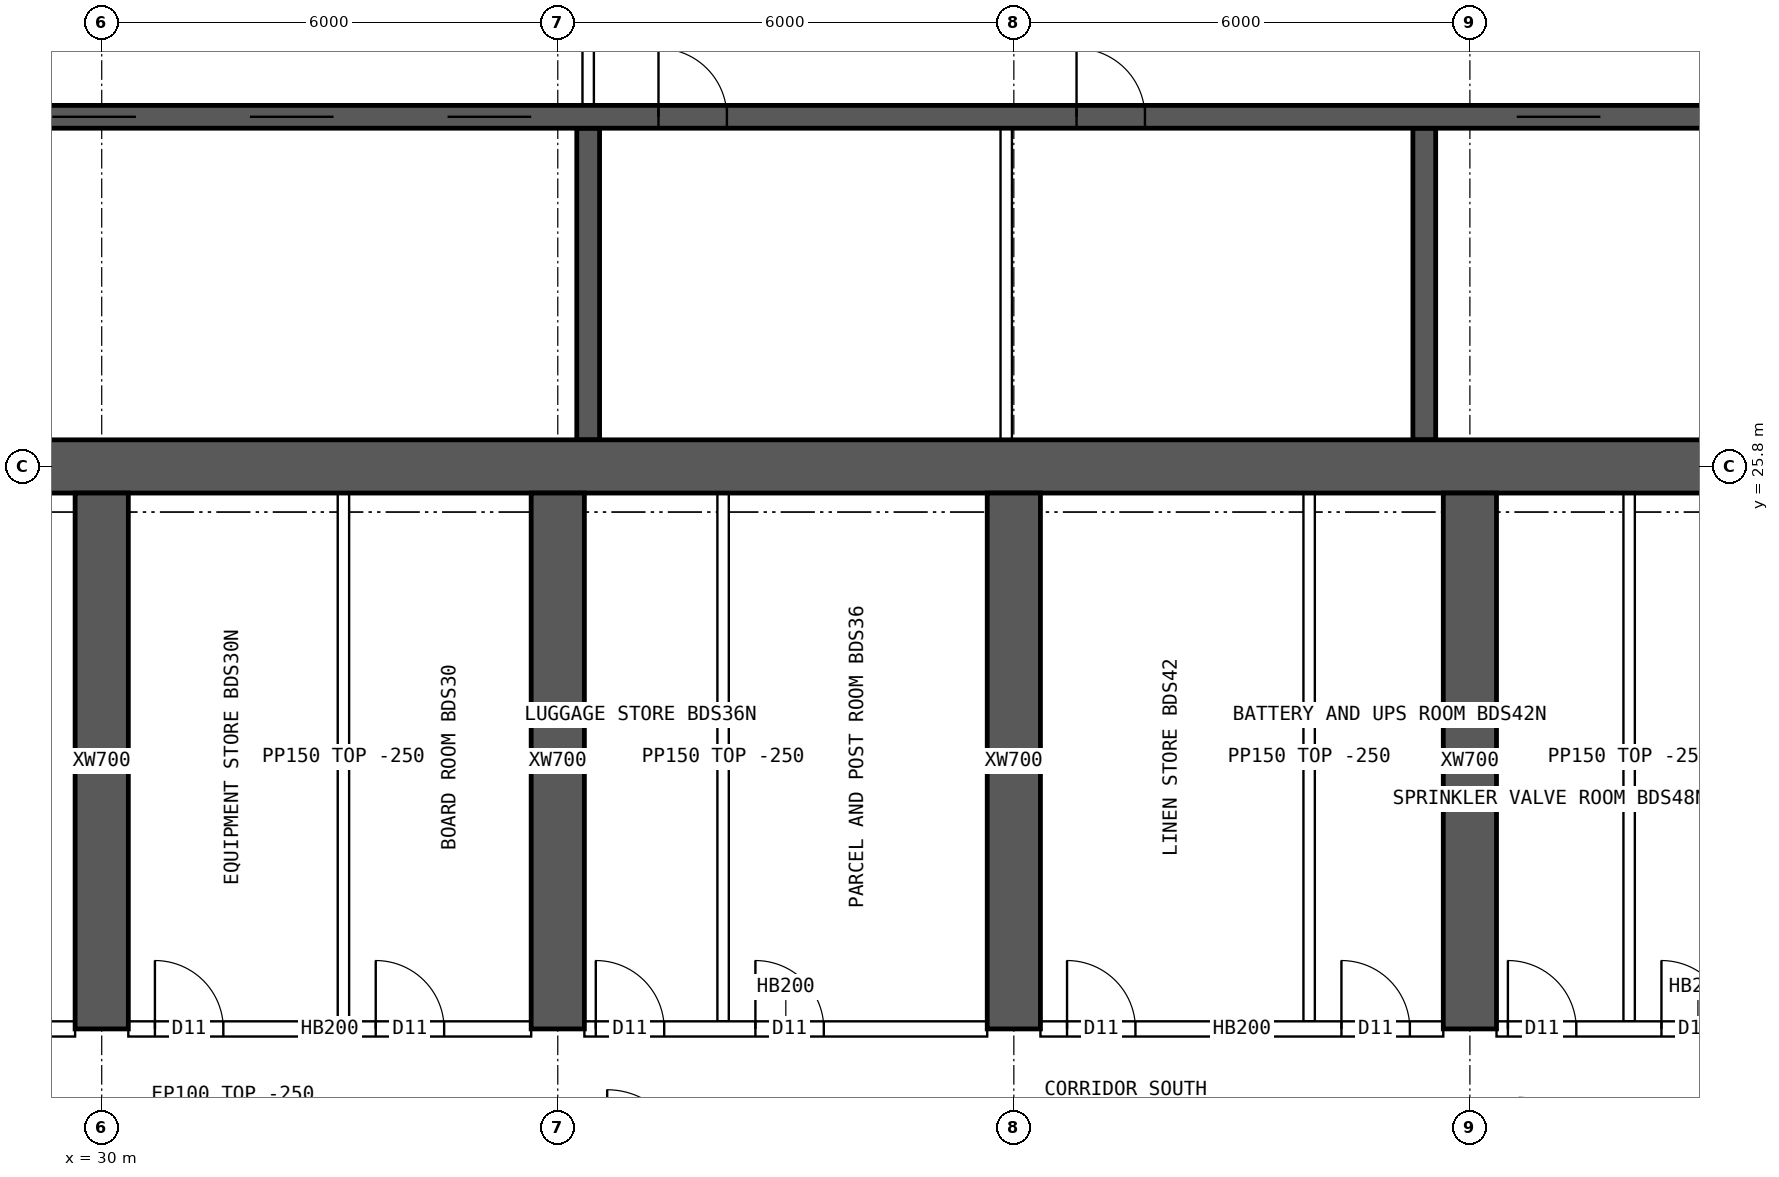
"""IFC4 building model, lengths in metres.
Left out: names, types, materials, properties, quantities, classifications, styles, units other than length and angle.
Written with IfcOpenShell. Run it as: python <this file> out.ifc"""

import sys

from ifc_helpers import new_model, si_unit, direction, frame, frame_2d, origin, place, context, subcontext, project, spatial, rectangle, extrude, element, fill, save


model = new_model("IFC4")
c1 = context("Model", 3, precision=1e-05, world=origin(), true_north=direction((0.0, 1.0)))
c2 = subcontext(c1, "Body", "Model", "MODEL_VIEW")
j1 = project(units=[si_unit("LENGTHUNIT", "METRE"), si_unit("PLANEANGLEUNIT", "RADIAN")], contexts=[c1])
p1 = place(None, origin())
s1 = spatial("IfcSite", under=j1, at=p1, CompositionType="ELEMENT")
p2 = place(p1, origin())
s2 = spatial("IfcBuilding", under=s1, at=p2, CompositionType="ELEMENT")
p3 = place(p2, frame((0.0, 0.0, 239.05)))
s3 = spatial("IfcBuildingStorey", under=s2, at=p3, CompositionType="ELEMENT", Elevation=239.05)
p4 = place(p3, frame((18.0, 25.8, 0.0), z_axis=(0.0, 0.0, 1.0), x_axis=(1.0, 0.0, 0.0)))
e1 = element("IfcWall", 1, at=p4, inside=s3, PredefinedType="SHEAR", context=c2, shape_type="SweptSolid", body=[
    extrude(rectangle(XDim=48.0, YDim=0.7, at=frame_2d((24.0, 0.0))), origin(), (0.0, 0.0, 1.0), 3.75),
])
p5 = place(p3, frame((18.35, 30.4, 0.0), z_axis=(0.0, 0.0, 1.0), x_axis=(1.0, 0.0, 0.0)))
e2 = element("IfcWall", 2, at=p5, inside=s3, PredefinedType="SHEAR", context=c2, shape_type="SweptSolid", body=[
    extrude(rectangle(XDim=47.3, YDim=0.3, at=frame_2d((23.65, 0.0))), origin(), (0.0, 0.0, 1.0), 3.75),
])
p6 = place(p5, frame((0.4, 0.0, 0.0)))
e3 = element("IfcOpeningElement", 3, at=p6, cuts=e2, PredefinedType="OPENING", context=c2, shape_type="SweptSolid", body=[
    extrude(rectangle(XDim=1.0, YDim=2.1, at=frame_2d((0.5, 1.05))), frame((0.0, 0.16, 0.0), z_axis=(0.0, -1.0, 0.0), x_axis=(1.0, 0.0, 0.0)), (0.0, 0.0, 1.0), 0.32),
])
p7 = place(p5, frame((45.9, 0.0, 0.0)))
e4 = element("IfcOpeningElement", 4, at=p7, cuts=e2, PredefinedType="OPENING", context=c2, shape_type="SweptSolid", body=[
    extrude(rectangle(XDim=1.0, YDim=2.1, at=frame_2d((0.5, 1.05))), frame((0.0, 0.16, 0.0), z_axis=(0.0, -1.0, 0.0), x_axis=(1.0, 0.0, 0.0)), (0.0, 0.0, 1.0), 0.32),
])
p8 = place(p5, frame((8.4, 0.0, 0.0)))
e5 = element("IfcOpeningElement", 5, at=p8, cuts=e2, PredefinedType="OPENING", context=c2, shape_type="SweptSolid", body=[
    extrude(rectangle(XDim=1.1, YDim=2.1, at=frame_2d((0.55, 1.05))), frame((0.0, 0.16, 0.0), z_axis=(0.0, -1.0, 0.0), x_axis=(1.0, 0.0, 0.0)), (0.0, 0.0, 1.0), 0.32),
])
p9 = place(p5, frame((11.0, 0.0, 0.0)))
e6 = element("IfcOpeningElement", 6, at=p9, cuts=e2, PredefinedType="OPENING", context=c2, shape_type="SweptSolid", body=[
    extrude(rectangle(XDim=1.1, YDim=2.1, at=frame_2d((0.55, 1.05))), frame((0.0, 0.16, 0.0), z_axis=(0.0, -1.0, 0.0), x_axis=(1.0, 0.0, 0.0)), (0.0, 0.0, 1.0), 0.32),
])
p10 = place(p5, frame((13.6, 0.0, 0.0)))
e7 = element("IfcOpeningElement", 7, at=p10, cuts=e2, PredefinedType="OPENING", context=c2, shape_type="SweptSolid", body=[
    extrude(rectangle(XDim=1.1, YDim=2.1, at=frame_2d((0.55, 1.05))), frame((0.0, 0.16, 0.0), z_axis=(0.0, -1.0, 0.0), x_axis=(1.0, 0.0, 0.0)), (0.0, 0.0, 1.0), 0.32),
])
p11 = place(p5, frame((16.2, 0.0, 0.0)))
e8 = element("IfcOpeningElement", 8, at=p11, cuts=e2, PredefinedType="OPENING", context=c2, shape_type="SweptSolid", body=[
    extrude(rectangle(XDim=1.1, YDim=2.1, at=frame_2d((0.55, 1.05))), frame((0.0, 0.16, 0.0), z_axis=(0.0, -1.0, 0.0), x_axis=(1.0, 0.0, 0.0)), (0.0, 0.0, 1.0), 0.32),
])
p12 = place(p5, frame((18.975, 0.0, 0.0)))
e9 = element("IfcOpeningElement", 9, at=p12, cuts=e2, PredefinedType="OPENING", context=c2, shape_type="SweptSolid", body=[
    extrude(rectangle(XDim=0.9, YDim=2.1, at=frame_2d((0.45, 1.05))), frame((0.0, 0.16, 0.0), z_axis=(0.0, -1.0, 0.0), x_axis=(1.0, 0.0, 0.0)), (0.0, 0.0, 1.0), 0.32),
])
p13 = place(p5, frame((24.475, 0.0, 0.0)))
e10 = element("IfcOpeningElement", 10, at=p13, cuts=e2, PredefinedType="OPENING", context=c2, shape_type="SweptSolid", body=[
    extrude(rectangle(XDim=0.9, YDim=2.1, at=frame_2d((0.45, 1.05))), frame((0.0, 0.16, 0.0), z_axis=(0.0, -1.0, 0.0), x_axis=(1.0, 0.0, 0.0)), (0.0, 0.0, 1.0), 0.32),
])
p14 = place(p5, frame((30.267, 0.0, 0.0)))
e11 = element("IfcOpeningElement", 11, at=p14, cuts=e2, PredefinedType="OPENING", context=c2, shape_type="SweptSolid", body=[
    extrude(rectangle(XDim=1.1, YDim=2.1, at=frame_2d((0.55, 1.05))), frame((0.0, 0.16, 0.0), z_axis=(0.0, -1.0, 0.0), x_axis=(1.0, 0.0, 0.0)), (0.0, 0.0, 1.0), 0.32),
])
p15 = place(p5, frame((33.8, 0.0, 0.0)))
e12 = element("IfcOpeningElement", 12, at=p15, cuts=e2, PredefinedType="OPENING", context=c2, shape_type="SweptSolid", body=[
    extrude(rectangle(XDim=1.1, YDim=2.1, at=frame_2d((0.55, 1.05))), frame((0.0, 0.16, 0.0), z_axis=(0.0, -1.0, 0.0), x_axis=(1.0, 0.0, 0.0)), (0.0, 0.0, 1.0), 0.32),
])
p16 = place(p5, frame((37.333, 0.0, 0.0)))
e13 = element("IfcOpeningElement", 13, at=p16, cuts=e2, PredefinedType="OPENING", context=c2, shape_type="SweptSolid", body=[
    extrude(rectangle(XDim=1.1, YDim=2.1, at=frame_2d((0.55, 1.05))), frame((0.0, 0.16, 0.0), z_axis=(0.0, -1.0, 0.0), x_axis=(1.0, 0.0, 0.0)), (0.0, 0.0, 1.0), 0.32),
])
for number, where, z_axis, x_axis in (
    (14, (36.4, 26.15, 0.0), (0.0, 0.0, 1.0), (0.0, 1.0, 0.0)),
    (15, (47.4, 26.15, 0.0), (0.0, 0.0, 1.0), (0.0, 1.0, 0.0)),
):
    element("IfcWall", number, at=place(p3, frame(where, z_axis=z_axis, x_axis=x_axis)), inside=s3, PredefinedType="SHEAR", context=c2, shape_type="SweptSolid", body=[
        extrude(rectangle(XDim=4.1, YDim=0.3, at=frame_2d((2.05, 0.0))), origin(), (0.0, 0.0, 1.0), 3.75),
    ])
for number, where, z_axis, x_axis in (
    (16, (30.0, 18.4, 0.0), (0.0, 0.0, 1.0), (0.0, 1.0, 0.0)),
    (17, (36.0, 18.4, 0.0), (0.0, 0.0, 1.0), (0.0, 1.0, 0.0)),
    (18, (42.0, 18.4, 0.0), (0.0, 0.0, 1.0), (0.0, 1.0, 0.0)),
    (19, (48.0, 18.4, 0.0), (0.0, 0.0, 1.0), (0.0, 1.0, 0.0)),
):
    element("IfcWall", number, at=place(p3, frame(where, z_axis=z_axis, x_axis=x_axis)), inside=s3, PredefinedType="SHEAR", context=c2, shape_type="SweptSolid", body=[
        extrude(rectangle(XDim=7.05, YDim=0.7, at=frame_2d((3.525, 0.0))), origin(), (0.0, 0.0, 1.0), 3.75),
    ])
p17 = place(p3, frame((36.4, 30.55, 0.0), z_axis=(0.0, 0.0, 1.0), x_axis=(0.0, 1.0, 0.0)))
e20 = element("IfcWall", 20, at=p17, inside=s3, PredefinedType="SOLIDWALL", context=c2, shape_type="SweptSolid", body=[
    extrude(rectangle(XDim=3.9, YDim=0.15, at=frame_2d((1.95, 0.0))), origin(), (0.0, 0.0, 1.0), 3.5),
])
p18 = place(p17, frame((1.15, 0.0, 0.0)))
e21 = element("IfcOpeningElement", 21, at=p18, cuts=e20, PredefinedType="OPENING", context=c2, shape_type="SweptSolid", body=[
    extrude(rectangle(XDim=1.6, YDim=2.1, at=frame_2d((0.8, 1.05))), frame((0.0, 0.085, 0.0), z_axis=(0.0, -1.0, 0.0), x_axis=(1.0, 0.0, 0.0)), (0.0, 0.0, 1.0), 0.17),
])
p19 = place(p3, frame((41.9, 26.15, 0.0), z_axis=(0.0, 0.0, 1.0), x_axis=(0.0, 1.0, 0.0)))
e22 = element("IfcWall", 22, at=p19, inside=s3, PredefinedType="SOLIDWALL", context=c2, shape_type="SweptSolid", body=[
    extrude(rectangle(XDim=4.1, YDim=0.15, at=frame_2d((2.05, 0.0))), origin(), (0.0, 0.0, 1.0), 3.5),
])
p20 = place(p3, frame((24.35, 18.4, 0.0), z_axis=(0.0, 0.0, 1.0), x_axis=(1.0, 0.0, 0.0)))
e23 = element("IfcWall", 23, at=p20, inside=s3, PredefinedType="SOLIDWALL", context=c2, shape_type="SweptSolid", body=[
    extrude(rectangle(XDim=5.3, YDim=0.2, at=frame_2d((2.65, 0.0))), origin(), (0.0, 0.0, 1.0), 3.5),
])
p21 = place(p20, frame((0.15, 0.0, 0.0)))
e24 = element("IfcOpeningElement", 24, at=p21, cuts=e23, PredefinedType="OPENING", context=c2, shape_type="SweptSolid", body=[
    extrude(rectangle(XDim=0.9, YDim=2.1, at=frame_2d((0.45, 1.05))), frame((0.0, 0.11, 0.0), z_axis=(0.0, -1.0, 0.0), x_axis=(1.0, 0.0, 0.0)), (0.0, 0.0, 1.0), 0.22),
])
p22 = place(p20, frame((2.79, 0.0, 0.0)))
e25 = element("IfcOpeningElement", 25, at=p22, cuts=e23, PredefinedType="OPENING", context=c2, shape_type="SweptSolid", body=[
    extrude(rectangle(XDim=0.9, YDim=2.1, at=frame_2d((0.45, 1.05))), frame((0.0, 0.11, 0.0), z_axis=(0.0, -1.0, 0.0), x_axis=(1.0, 0.0, 0.0)), (0.0, 0.0, 1.0), 0.22),
])
p23 = place(p3, frame((30.35, 18.4, 0.0), z_axis=(0.0, 0.0, 1.0), x_axis=(1.0, 0.0, 0.0)))
e26 = element("IfcWall", 26, at=p23, inside=s3, PredefinedType="SOLIDWALL", context=c2, shape_type="SweptSolid", body=[
    extrude(rectangle(XDim=5.3, YDim=0.2, at=frame_2d((2.65, 0.0))), origin(), (0.0, 0.0, 1.0), 3.5),
])
p24 = place(p23, frame((0.35, 0.0, 0.0)))
e27 = element("IfcOpeningElement", 27, at=p24, cuts=e26, PredefinedType="OPENING", context=c2, shape_type="SweptSolid", body=[
    extrude(rectangle(XDim=0.9, YDim=2.1, at=frame_2d((0.45, 1.05))), frame((0.0, 0.11, 0.0), z_axis=(0.0, -1.0, 0.0), x_axis=(1.0, 0.0, 0.0)), (0.0, 0.0, 1.0), 0.22),
])
p25 = place(p23, frame((3.255, 0.0, 0.0)))
e28 = element("IfcOpeningElement", 28, at=p25, cuts=e26, PredefinedType="OPENING", context=c2, shape_type="SweptSolid", body=[
    extrude(rectangle(XDim=0.9, YDim=2.1, at=frame_2d((0.45, 1.05))), frame((0.0, 0.11, 0.0), z_axis=(0.0, -1.0, 0.0), x_axis=(1.0, 0.0, 0.0)), (0.0, 0.0, 1.0), 0.22),
])
p26 = place(p3, frame((36.35, 18.4, 0.0), z_axis=(0.0, 0.0, 1.0), x_axis=(1.0, 0.0, 0.0)))
e29 = element("IfcWall", 29, at=p26, inside=s3, PredefinedType="SOLIDWALL", context=c2, shape_type="SweptSolid", body=[
    extrude(rectangle(XDim=5.3, YDim=0.2, at=frame_2d((2.65, 0.0))), origin(), (0.0, 0.0, 1.0), 3.5),
])
p27 = place(p26, frame((0.15, 0.0, 0.0)))
e30 = element("IfcOpeningElement", 30, at=p27, cuts=e29, PredefinedType="OPENING", context=c2, shape_type="SweptSolid", body=[
    extrude(rectangle(XDim=0.9, YDim=2.1, at=frame_2d((0.45, 1.05))), frame((0.0, 0.11, 0.0), z_axis=(0.0, -1.0, 0.0), x_axis=(1.0, 0.0, 0.0)), (0.0, 0.0, 1.0), 0.22),
])
p28 = place(p26, frame((2.25, 0.0, 0.0)))
e31 = element("IfcOpeningElement", 31, at=p28, cuts=e29, PredefinedType="OPENING", context=c2, shape_type="SweptSolid", body=[
    extrude(rectangle(XDim=0.9, YDim=2.1, at=frame_2d((0.45, 1.05))), frame((0.0, 0.11, 0.0), z_axis=(0.0, -1.0, 0.0), x_axis=(1.0, 0.0, 0.0)), (0.0, 0.0, 1.0), 0.22),
])
p29 = place(p3, frame((42.35, 18.4, 0.0), z_axis=(0.0, 0.0, 1.0), x_axis=(1.0, 0.0, 0.0)))
e32 = element("IfcWall", 32, at=p29, inside=s3, PredefinedType="SOLIDWALL", context=c2, shape_type="SweptSolid", body=[
    extrude(rectangle(XDim=5.3, YDim=0.2, at=frame_2d((2.65, 0.0))), origin(), (0.0, 0.0, 1.0), 3.5),
])
p30 = place(p29, frame((0.35, 0.0, 0.0)))
e33 = element("IfcOpeningElement", 33, at=p30, cuts=e32, PredefinedType="OPENING", context=c2, shape_type="SweptSolid", body=[
    extrude(rectangle(XDim=0.9, YDim=2.1, at=frame_2d((0.45, 1.05))), frame((0.0, 0.11, 0.0), z_axis=(0.0, -1.0, 0.0), x_axis=(1.0, 0.0, 0.0)), (0.0, 0.0, 1.0), 0.22),
])
p31 = place(p29, frame((3.96, 0.0, 0.0)))
e34 = element("IfcOpeningElement", 34, at=p31, cuts=e32, PredefinedType="OPENING", context=c2, shape_type="SweptSolid", body=[
    extrude(rectangle(XDim=0.9, YDim=2.1, at=frame_2d((0.45, 1.05))), frame((0.0, 0.11, 0.0), z_axis=(0.0, -1.0, 0.0), x_axis=(1.0, 0.0, 0.0)), (0.0, 0.0, 1.0), 0.22),
])
p32 = place(p3, frame((48.35, 18.4, 0.0), z_axis=(0.0, 0.0, 1.0), x_axis=(1.0, 0.0, 0.0)))
e35 = element("IfcWall", 35, at=p32, inside=s3, PredefinedType="SOLIDWALL", context=c2, shape_type="SweptSolid", body=[
    extrude(rectangle(XDim=5.3, YDim=0.2, at=frame_2d((2.65, 0.0))), origin(), (0.0, 0.0, 1.0), 3.5),
])
p33 = place(p32, frame((0.15, 0.0, 0.0)))
e36 = element("IfcOpeningElement", 36, at=p33, cuts=e35, PredefinedType="OPENING", context=c2, shape_type="SweptSolid", body=[
    extrude(rectangle(XDim=0.9, YDim=2.1, at=frame_2d((0.45, 1.05))), frame((0.0, 0.11, 0.0), z_axis=(0.0, -1.0, 0.0), x_axis=(1.0, 0.0, 0.0)), (0.0, 0.0, 1.0), 0.22),
])
p34 = place(p32, frame((2.17, 0.0, 0.0)))
e37 = element("IfcOpeningElement", 37, at=p34, cuts=e35, PredefinedType="OPENING", context=c2, shape_type="SweptSolid", body=[
    extrude(rectangle(XDim=0.9, YDim=2.1, at=frame_2d((0.45, 1.05))), frame((0.0, 0.11, 0.0), z_axis=(0.0, -1.0, 0.0), x_axis=(1.0, 0.0, 0.0)), (0.0, 0.0, 1.0), 0.22),
])
for number, where, z_axis, x_axis in (
    (38, (33.18, 18.5, 0.0), (0.0, 0.0, 1.0), (0.0, 1.0, 0.0)),
    (39, (38.175, 18.5, 0.0), (0.0, 0.0, 1.0), (0.0, 1.0, 0.0)),
    (40, (45.885, 18.5, 0.0), (0.0, 0.0, 1.0), (0.0, 1.0, 0.0)),
    (41, (50.095, 18.5, 0.0), (0.0, 0.0, 1.0), (0.0, 1.0, 0.0)),
):
    element("IfcWall", number, at=place(p3, frame(where, z_axis=z_axis, x_axis=x_axis)), inside=s3, PredefinedType="PARTITIONING", context=c2, shape_type="SweptSolid", body=[
        extrude(rectangle(XDim=6.95, YDim=0.15, at=frame_2d((3.475, 0.0))), origin(), (0.0, 0.0, 1.0), 3.5),
    ])
p35 = place(p9, origin())
e42 = element("IfcDoor", 42, at=p35, inside=s3, OperationType="DOUBLE_DOOR_SLIDING", PredefinedType="DOOR", context=c2, shape_type="SweptSolid", body=[
    extrude(rectangle(XDim=1.1, YDim=2.1, at=frame_2d((0.55, 1.05))), frame((0.0, 0.025, 0.0), z_axis=(0.0, -1.0, 0.0), x_axis=(1.0, 0.0, 0.0)), (0.0, 0.0, 1.0), 0.05),
])
fill(e6, e42)
p36 = place(p10, origin())
e43 = element("IfcDoor", 43, at=p36, inside=s3, OperationType="DOUBLE_DOOR_SLIDING", PredefinedType="DOOR", context=c2, shape_type="SweptSolid", body=[
    extrude(rectangle(XDim=1.1, YDim=2.1, at=frame_2d((0.55, 1.05))), frame((0.0, 0.025, 0.0), z_axis=(0.0, -1.0, 0.0), x_axis=(1.0, 0.0, 0.0)), (0.0, 0.0, 1.0), 0.05),
])
fill(e7, e43)
p37 = place(p11, origin())
e44 = element("IfcDoor", 44, at=p37, inside=s3, OperationType="DOUBLE_DOOR_SLIDING", PredefinedType="DOOR", context=c2, shape_type="SweptSolid", body=[
    extrude(rectangle(XDim=1.1, YDim=2.1, at=frame_2d((0.55, 1.05))), frame((0.0, 0.025, 0.0), z_axis=(0.0, -1.0, 0.0), x_axis=(1.0, 0.0, 0.0)), (0.0, 0.0, 1.0), 0.05),
])
fill(e8, e44)
p38 = place(p12, origin())
e45 = element("IfcDoor", 45, at=p38, inside=s3, OperationType="SINGLE_SWING_LEFT", PredefinedType="DOOR", context=c2, shape_type="SweptSolid", body=[
    extrude(rectangle(XDim=0.9, YDim=2.1, at=frame_2d((0.45, 1.05))), frame((0.0, 0.025, 0.0), z_axis=(0.0, -1.0, 0.0), x_axis=(1.0, 0.0, 0.0)), (0.0, 0.0, 1.0), 0.05),
])
fill(e9, e45)
p39 = place(p13, origin())
e46 = element("IfcDoor", 46, at=p39, inside=s3, OperationType="SINGLE_SWING_LEFT", PredefinedType="DOOR", context=c2, shape_type="SweptSolid", body=[
    extrude(rectangle(XDim=0.9, YDim=2.1, at=frame_2d((0.45, 1.05))), frame((0.0, 0.025, 0.0), z_axis=(0.0, -1.0, 0.0), x_axis=(1.0, 0.0, 0.0)), (0.0, 0.0, 1.0), 0.05),
])
fill(e10, e46)
p40 = place(p14, origin())
e47 = element("IfcDoor", 47, at=p40, inside=s3, OperationType="DOUBLE_DOOR_SLIDING", PredefinedType="DOOR", context=c2, shape_type="SweptSolid", body=[
    extrude(rectangle(XDim=1.1, YDim=2.1, at=frame_2d((0.55, 1.05))), frame((0.0, 0.025, 0.0), z_axis=(0.0, -1.0, 0.0), x_axis=(1.0, 0.0, 0.0)), (0.0, 0.0, 1.0), 0.05),
])
fill(e11, e47)
p41 = place(p24, origin())
e48 = element("IfcDoor", 48, at=p41, inside=s3, OperationType="SINGLE_SWING_LEFT", PredefinedType="DOOR", context=c2, shape_type="SweptSolid", body=[
    extrude(rectangle(XDim=0.9, YDim=2.1, at=frame_2d((0.45, 1.05))), frame((0.0, 0.025, 0.0), z_axis=(0.0, -1.0, 0.0), x_axis=(1.0, 0.0, 0.0)), (0.0, 0.0, 1.0), 0.05),
])
fill(e27, e48)
p42 = place(p25, origin())
e49 = element("IfcDoor", 49, at=p42, inside=s3, OperationType="SINGLE_SWING_LEFT", PredefinedType="DOOR", context=c2, shape_type="SweptSolid", body=[
    extrude(rectangle(XDim=0.9, YDim=2.1, at=frame_2d((0.45, 1.05))), frame((0.0, 0.025, 0.0), z_axis=(0.0, -1.0, 0.0), x_axis=(1.0, 0.0, 0.0)), (0.0, 0.0, 1.0), 0.05),
])
fill(e28, e49)
p43 = place(p27, origin())
e50 = element("IfcDoor", 50, at=p43, inside=s3, OperationType="SINGLE_SWING_LEFT", PredefinedType="DOOR", context=c2, shape_type="SweptSolid", body=[
    extrude(rectangle(XDim=0.9, YDim=2.1, at=frame_2d((0.45, 1.05))), frame((0.0, 0.025, 0.0), z_axis=(0.0, -1.0, 0.0), x_axis=(1.0, 0.0, 0.0)), (0.0, 0.0, 1.0), 0.05),
])
fill(e30, e50)
p44 = place(p28, origin())
e51 = element("IfcDoor", 51, at=p44, inside=s3, OperationType="SINGLE_SWING_LEFT", PredefinedType="DOOR", context=c2, shape_type="SweptSolid", body=[
    extrude(rectangle(XDim=0.9, YDim=2.1, at=frame_2d((0.45, 1.05))), frame((0.0, 0.025, 0.0), z_axis=(0.0, -1.0, 0.0), x_axis=(1.0, 0.0, 0.0)), (0.0, 0.0, 1.0), 0.05),
])
fill(e31, e51)
p45 = place(p30, origin())
e52 = element("IfcDoor", 52, at=p45, inside=s3, OperationType="SINGLE_SWING_LEFT", PredefinedType="DOOR", context=c2, shape_type="SweptSolid", body=[
    extrude(rectangle(XDim=0.9, YDim=2.1, at=frame_2d((0.45, 1.05))), frame((0.0, 0.025, 0.0), z_axis=(0.0, -1.0, 0.0), x_axis=(1.0, 0.0, 0.0)), (0.0, 0.0, 1.0), 0.05),
])
fill(e33, e52)
p46 = place(p31, origin())
e53 = element("IfcDoor", 53, at=p46, inside=s3, OperationType="SINGLE_SWING_LEFT", PredefinedType="DOOR", context=c2, shape_type="SweptSolid", body=[
    extrude(rectangle(XDim=0.9, YDim=2.1, at=frame_2d((0.45, 1.05))), frame((0.0, 0.025, 0.0), z_axis=(0.0, -1.0, 0.0), x_axis=(1.0, 0.0, 0.0)), (0.0, 0.0, 1.0), 0.05),
])
fill(e34, e53)
p47 = place(p33, origin())
e54 = element("IfcDoor", 54, at=p47, inside=s3, OperationType="SINGLE_SWING_LEFT", PredefinedType="DOOR", context=c2, shape_type="SweptSolid", body=[
    extrude(rectangle(XDim=0.9, YDim=2.1, at=frame_2d((0.45, 1.05))), frame((0.0, 0.025, 0.0), z_axis=(0.0, -1.0, 0.0), x_axis=(1.0, 0.0, 0.0)), (0.0, 0.0, 1.0), 0.05),
])
fill(e36, e54)
p48 = place(p34, origin())
e55 = element("IfcDoor", 55, at=p48, inside=s3, OperationType="SINGLE_SWING_LEFT", PredefinedType="DOOR", context=c2, shape_type="SweptSolid", body=[
    extrude(rectangle(XDim=0.9, YDim=2.1, at=frame_2d((0.45, 1.05))), frame((0.0, 0.025, 0.0), z_axis=(0.0, -1.0, 0.0), x_axis=(1.0, 0.0, 0.0)), (0.0, 0.0, 1.0), 0.05),
])
fill(e37, e55)
save(model, sys.argv[1])
